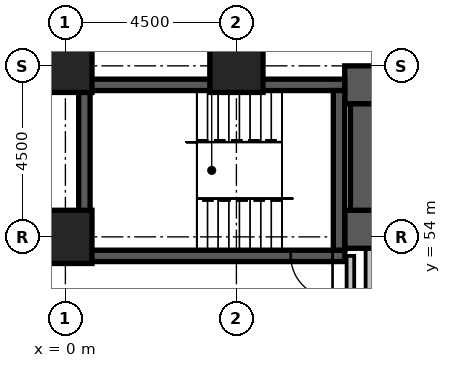
"""IFC4 building model, lengths in metres.
Left out: names, types, materials, properties, quantities, classifications, styles, units other than length and angle.
Written with IfcOpenShell. Run it as: python <this file> out.ifc"""

import sys

from ifc_helpers import new_model, si_unit, direction, frame, frame_2d, origin, origin_2d, place, context, subcontext, project, spatial, rectangle, extrude, element, fill, save


model = new_model("IFC4")
c1 = context("Model", 3, precision=1e-05, world=origin(), true_north=direction((0.0, 1.0)))
c2 = subcontext(c1, "Body", "Model", "MODEL_VIEW")
j1 = project(units=[si_unit("LENGTHUNIT", "METRE"), si_unit("PLANEANGLEUNIT", "RADIAN")], contexts=[c1])
p1 = place(None, origin())
s1 = spatial("IfcSite", under=j1, at=p1, CompositionType="ELEMENT")
p2 = place(p1, origin())
s2 = spatial("IfcBuilding", under=s1, at=p2, CompositionType="ELEMENT")
p3 = place(p2, frame((0.0, 0.0, 9.0)))
s3 = spatial("IfcBuildingStorey", under=s2, at=p3, CompositionType="ELEMENT", Elevation=9.0)
p4 = place(p3, frame((0.35, 53.5, -0.6), z_axis=(0.0, 0.0, 1.0), x_axis=(1.0, 0.0, 0.0)))
e1 = element("IfcWall", 1, at=p4, inside=s3, PredefinedType="SHEAR", context=c2, shape_type="SweptSolid", body=[
    extrude(rectangle(XDim=7.0, YDim=0.3, at=frame_2d((3.5, 0.0))), origin(), (0.0, 0.0, 1.0), 5.2),
])
p5 = place(p4, frame((5.58, 0.0, 0.6)))
e2 = element("IfcOpeningElement", 2, at=p5, cuts=e1, PredefinedType="OPENING", context=c2, shape_type="SweptSolid", body=[
    extrude(rectangle(XDim=1.1, YDim=2.1, at=frame_2d((0.55, 1.05))), frame((0.0, 0.162, 0.0), z_axis=(0.0, -1.0, 0.0), x_axis=(1.0, 0.0, 0.0)), (0.0, 0.0, 1.0), 0.324),
])
p6 = place(p3, frame((0.35, 58.0, -0.6), z_axis=(0.0, 0.0, 1.0), x_axis=(1.0, 0.0, 0.0)))
e3 = element("IfcWall", 3, at=p6, inside=s3, PredefinedType="SHEAR", context=c2, shape_type="SweptSolid", body=[
    extrude(rectangle(XDim=7.0, YDim=0.3, at=frame_2d((3.5, 0.0))), origin(), (0.0, 0.0, 1.0), 5.2),
])
for number, where, z_axis, x_axis in (
    (4, (0.5, 53.65, -0.6), (0.0, 0.0, 1.0), (0.0, 1.0, 0.0)),
    (5, (7.2, 53.65, -0.6), (0.0, 0.0, 1.0), (0.0, 1.0, 0.0)),
):
    element("IfcWall", number, at=place(p3, frame(where, z_axis=z_axis, x_axis=x_axis)), inside=s3, PredefinedType="SHEAR", context=c2, shape_type="SweptSolid", body=[
        extrude(rectangle(XDim=4.2, YDim=0.3, at=frame_2d((2.1, 0.0))), origin(), (0.0, 0.0, 1.0), 5.2),
    ])
p7 = place(p3, frame((7.35, 54.2, -0.6), z_axis=(0.0, 0.0, 1.0), x_axis=(1.0, 0.0, 0.0)))
e6 = element("IfcWall", 6, at=p7, inside=s3, PredefinedType="SHEAR", context=c2, shape_type="SweptSolid", body=[
    extrude(rectangle(XDim=16.35, YDim=1.0, at=frame_2d((8.175, 0.0))), origin(), (0.0, 0.0, 1.0), 5.2),
])
p8 = place(p7, frame((1.35, 0.0, 0.6)))
e7 = element("IfcOpeningElement", 7, at=p8, cuts=e6, PredefinedType="OPENING", context=c2, shape_type="SweptSolid", body=[
    extrude(rectangle(XDim=1.1, YDim=2.1, at=frame_2d((0.55, 1.05))), frame((0.0, 0.512, 0.0), z_axis=(0.0, -1.0, 0.0), x_axis=(1.0, 0.0, 0.0)), (0.0, 0.0, 1.0), 1.024),
])
p9 = place(p7, frame((3.85, 0.0, 0.6)))
e8 = element("IfcOpeningElement", 8, at=p9, cuts=e6, PredefinedType="OPENING", context=c2, shape_type="SweptSolid", body=[
    extrude(rectangle(XDim=1.1, YDim=2.1, at=frame_2d((0.55, 1.05))), frame((0.0, 0.512, 0.0), z_axis=(0.0, -1.0, 0.0), x_axis=(1.0, 0.0, 0.0)), (0.0, 0.0, 1.0), 1.024),
])
p10 = place(p7, frame((6.35, 0.0, 0.6)))
e9 = element("IfcOpeningElement", 9, at=p10, cuts=e6, PredefinedType="OPENING", context=c2, shape_type="SweptSolid", body=[
    extrude(rectangle(XDim=1.1, YDim=2.1, at=frame_2d((0.55, 1.05))), frame((0.0, 0.512, 0.0), z_axis=(0.0, -1.0, 0.0), x_axis=(1.0, 0.0, 0.0)), (0.0, 0.0, 1.0), 1.024),
])
p11 = place(p7, frame((8.85, 0.0, 0.6)))
e10 = element("IfcOpeningElement", 10, at=p11, cuts=e6, PredefinedType="OPENING", context=c2, shape_type="SweptSolid", body=[
    extrude(rectangle(XDim=1.1, YDim=2.1, at=frame_2d((0.55, 1.05))), frame((0.0, 0.512, 0.0), z_axis=(0.0, -1.0, 0.0), x_axis=(1.0, 0.0, 0.0)), (0.0, 0.0, 1.0), 1.024),
])
p12 = place(p7, frame((11.35, 0.0, 0.6)))
e11 = element("IfcOpeningElement", 11, at=p12, cuts=e6, PredefinedType="OPENING", context=c2, shape_type="SweptSolid", body=[
    extrude(rectangle(XDim=1.1, YDim=2.1, at=frame_2d((0.55, 1.05))), frame((0.0, 0.512, 0.0), z_axis=(0.0, -1.0, 0.0), x_axis=(1.0, 0.0, 0.0)), (0.0, 0.0, 1.0), 1.024),
])
p13 = place(p7, frame((13.85, 0.0, 0.6)))
e12 = element("IfcOpeningElement", 12, at=p13, cuts=e6, PredefinedType="OPENING", context=c2, shape_type="SweptSolid", body=[
    extrude(rectangle(XDim=1.1, YDim=2.1, at=frame_2d((0.55, 1.05))), frame((0.0, 0.512, 0.0), z_axis=(0.0, -1.0, 0.0), x_axis=(1.0, 0.0, 0.0)), (0.0, 0.0, 1.0), 1.024),
])
p14 = place(p3, frame((7.35, 58.0, -0.6), z_axis=(0.0, 0.0, 1.0), x_axis=(1.0, 0.0, 0.0)))
e13 = element("IfcWall", 13, at=p14, inside=s3, PredefinedType="SHEAR", context=c2, shape_type="SweptSolid", body=[
    extrude(rectangle(XDim=16.35, YDim=1.0, at=frame_2d((8.175, 0.0))), origin(), (0.0, 0.0, 1.0), 5.2),
])
p15 = place(p3, frame((8.0, 54.7, -0.6), z_axis=(0.0, 0.0, 1.0), x_axis=(0.0, 1.0, 0.0)))
e14 = element("IfcWall", 14, at=p15, inside=s3, PredefinedType="SHEAR", context=c2, shape_type="SweptSolid", body=[
    extrude(rectangle(XDim=2.8, YDim=1.0, at=frame_2d((1.4, 0.0))), origin(), (0.0, 0.0, 1.0), 5.2),
])
for number, where, z_axis, x_axis in (
    (15, (0.0, 54.0, -0.6), (0.0, 0.0, 1.0), (1.0, 0.0, 0.0)),
    (16, (0.0, 58.5, -0.6), (0.0, 0.0, 1.0), (1.0, 0.0, 0.0)),
    (17, (4.5, 58.5, -0.6), (0.0, 0.0, 1.0), (1.0, 0.0, 0.0)),
):
    element("IfcColumn", number, at=place(p3, frame(where, z_axis=z_axis, x_axis=x_axis)), inside=s3, PredefinedType="COLUMN", context=c2, shape_type="SweptSolid", body=[
        extrude(rectangle(XDim=1.4, YDim=1.4, at=origin_2d()), origin(), (0.0, 0.0, 1.0), 5.2),
    ])
p16 = place(p3, frame((8.0, 51.45, 0.0), z_axis=(0.0, 0.0, 1.0), x_axis=(0.0, 1.0, 0.0)))
e18 = element("IfcWall", 18, at=p16, inside=s3, PredefinedType="PARTITIONING", context=c2, shape_type="SweptSolid", body=[
    extrude(rectangle(XDim=2.23, YDim=0.2, at=frame_2d((1.115, 0.0))), origin(), (0.0, 0.0, 1.0), 4.6),
])
p17 = place(p3, frame((7.5, 49.6, 0.0), z_axis=(0.0, 0.0, 1.0), x_axis=(0.0, 1.0, 0.0)))
e19 = element("IfcWall", 19, at=p17, inside=s3, PredefinedType="PARTITIONING", context=c2, shape_type="SweptSolid", body=[
    extrude(rectangle(XDim=3.9, YDim=0.2, at=frame_2d((1.95, 0.0))), origin(), (0.0, 0.0, 1.0), 4.6),
])
p18 = place(p17, frame((0.3, 0.0, 0.0)))
e20 = element("IfcOpeningElement", 20, at=p18, cuts=e19, PredefinedType="OPENING", context=c2, shape_type="SweptSolid", body=[
    extrude(rectangle(XDim=1.2, YDim=2.1, at=frame_2d((0.6, 1.05))), frame((0.0, 0.112, 0.0), z_axis=(0.0, -1.0, 0.0), x_axis=(1.0, 0.0, 0.0)), (0.0, 0.0, 1.0), 0.224),
])
p19 = place(p5, origin())
e21 = element("IfcDoor", 21, at=p19, inside=s3, OperationType="SINGLE_SWING_RIGHT", PredefinedType="DOOR", context=c2, shape_type="SweptSolid", body=[
    extrude(rectangle(XDim=1.1, YDim=2.1, at=frame_2d((0.55, 1.05))), frame((0.0, 0.025, 0.0), z_axis=(0.0, -1.0, 0.0), x_axis=(1.0, 0.0, 0.0)), (0.0, 0.0, 1.0), 0.05),
])
fill(e2, e21)
save(model, sys.argv[1])
